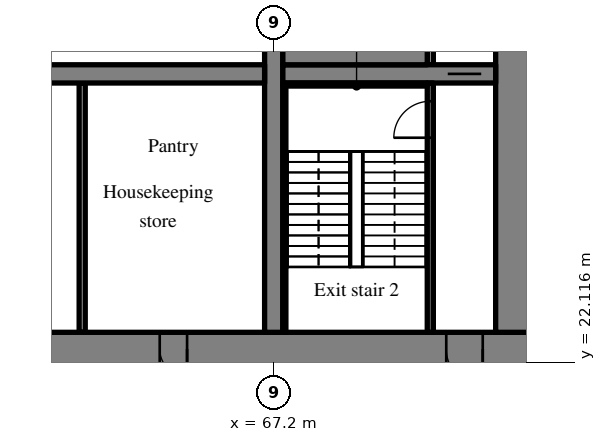
"""IFC4 building model, lengths in metres.
Left out: names, types, materials, properties, quantities, classifications, styles, units other than length and angle.
Written with IfcOpenShell. Run it as: python <this file> out.ifc"""

import sys

from ifc_helpers import new_model, si_unit, direction, frame, frame_2d, origin, place, context, subcontext, project, spatial, rectangle, extrude, source, transform, mapped, element, fill, save


model = new_model("IFC4")
c1 = context("Model", 3, precision=1e-05, world=origin(), true_north=direction((0.0, 1.0)))
c2 = subcontext(c1, "Body", "Model", "MODEL_VIEW")
j1 = project(units=[si_unit("LENGTHUNIT", "METRE"), si_unit("PLANEANGLEUNIT", "RADIAN")], contexts=[c1])
p1 = place(None, origin())
s1 = spatial("IfcSite", under=j1, at=p1, CompositionType="ELEMENT")
p2 = place(p1, origin())
s2 = spatial("IfcBuilding", under=s1, at=p2, CompositionType="ELEMENT")
p3 = place(p2, frame((0.0, 0.0, -9.0)))
s3 = spatial("IfcBuildingStorey", under=s2, at=p3, CompositionType="ELEMENT", Elevation=-9.0)
m1 = source(origin(), c2, "Body", "SweptSolid", [
    extrude(rectangle(XDim=50.4, YDim=1.1, at=frame_2d((25.2, 0.0))), origin(), (0.0, 0.0, 1.0), 4.22),
])
p4 = place(p3, frame((25.2, 22.55, 0.0), z_axis=(0.0, 0.0, 1.0), x_axis=(1.0, 0.0, 0.0)))
e1 = element("IfcWall", 1, at=p4, inside=s3, PredefinedType="SHEAR", context=c2, shape_type="MappedRepresentation", body=[
    mapped(m1, transform((0.0, 0.0, 0.0), scale=1.0)),
])
m2 = source(origin(), c2, "Body", "SweptSolid", [
    extrude(rectangle(XDim=1.8, YDim=2.1, at=frame_2d((0.9, 1.05))), frame((0.0, 0.56, 0.0), z_axis=(0.0, -1.0, 0.0), x_axis=(1.0, 0.0, 0.0)), (0.0, 0.0, 1.0), 1.12),
])
p5 = place(p4, frame((15.9, 0.0, 0.0)))
e2 = element("IfcOpeningElement", 2, at=p5, cuts=e1, PredefinedType="OPENING", context=c2, shape_type="MappedRepresentation", body=[
    mapped(m2, transform((0.0, 0.0, 0.0), scale=1.0)),
])
m3 = source(origin(), c2, "Body", "SweptSolid", [
    extrude(rectangle(XDim=1.2, YDim=2.1, at=frame_2d((0.6, 1.05))), frame((0.0, 0.56, 0.0), z_axis=(0.0, -1.0, 0.0), x_axis=(1.0, 0.0, 0.0)), (0.0, 0.0, 1.0), 1.12),
])
p6 = place(p4, frame((27.0, 0.0, 0.0)))
e3 = element("IfcOpeningElement", 3, at=p6, cuts=e1, PredefinedType="OPENING", context=c2, shape_type="MappedRepresentation", body=[
    mapped(m3, transform((0.0, 0.0, 0.0), scale=1.0)),
])
m4 = source(origin(), c2, "Body", "SweptSolid", [
    extrude(rectangle(XDim=0.9, YDim=2.1, at=frame_2d((0.45, 1.05))), frame((0.0, 0.56, 0.0), z_axis=(0.0, -1.0, 0.0), x_axis=(1.0, 0.0, 0.0)), (0.0, 0.0, 1.0), 1.12),
])
p7 = place(p4, frame((33.75, 0.0, 0.0)))
e4 = element("IfcOpeningElement", 4, at=p7, cuts=e1, PredefinedType="OPENING", context=c2, shape_type="MappedRepresentation", body=[
    mapped(m4, transform((0.0, 0.0, 0.0), scale=1.0)),
])
p8 = place(p4, frame((30.75, 0.0, 0.0)))
e5 = element("IfcOpeningElement", 5, at=p8, cuts=e1, PredefinedType="OPENING", context=c2, shape_type="MappedRepresentation", body=[
    mapped(m4, transform((0.0, 0.0, 0.0), scale=1.0)),
])
p9 = place(p4, frame((38.25, 0.0, 0.0)))
e6 = element("IfcOpeningElement", 6, at=p9, cuts=e1, PredefinedType="OPENING", context=c2, shape_type="MappedRepresentation", body=[
    mapped(m4, transform((0.0, 0.0, 0.0), scale=1.0)),
])
p10 = place(p4, frame((6.425, 0.0, 0.0)))
e7 = element("IfcOpeningElement", 7, at=p10, cuts=e1, PredefinedType="OPENING", context=c2, shape_type="MappedRepresentation", body=[
    mapped(m3, transform((0.0, 0.0, 0.0), scale=1.0)),
])
p11 = place(p4, frame((47.675, 0.0, 0.0)))
e8 = element("IfcOpeningElement", 8, at=p11, cuts=e1, PredefinedType="OPENING", context=c2, shape_type="MappedRepresentation", body=[
    mapped(m3, transform((0.0, 0.0, 0.0), scale=1.0)),
])
m5 = source(origin(), c2, "Body", "SweptSolid", [
    extrude(rectangle(XDim=17.8, YDim=1.1, at=frame_2d((8.9, 0.0))), origin(), (0.0, 0.0, 1.0), 4.22),
])
p12 = place(p3, frame((75.05, 23.1, 0.0), z_axis=(0.0, 0.0, 1.0), x_axis=(0.0, 1.0, 0.0)))
e9 = element("IfcWall", 9, at=p12, inside=s3, PredefinedType="SHEAR", context=c2, shape_type="MappedRepresentation", body=[
    mapped(m5, transform((0.0, 0.0, 0.0), scale=1.0)),
])
m6 = source(origin(), c2, "Body", "SweptSolid", [
    extrude(rectangle(XDim=17.8, YDim=0.6, at=frame_2d((8.9, 0.0))), origin(), (0.0, 0.0, 1.0), 4.22),
])
p13 = place(p3, frame((67.2, 23.1, 0.0), z_axis=(0.0, 0.0, 1.0), x_axis=(0.0, 1.0, 0.0)))
e10 = element("IfcWall", 10, at=p13, inside=s3, PredefinedType="SHEAR", context=c2, shape_type="MappedRepresentation", body=[
    mapped(m6, transform((0.0, 0.0, 0.0), scale=1.0)),
])
m7 = source(origin(), c2, "Body", "SweptSolid", [
    extrude(rectangle(XDim=16.2, YDim=0.6, at=frame_2d((8.1, 0.0))), origin(), (0.0, 0.0, 1.0), 4.22),
])
p14 = place(p3, frame((50.7, 31.6, 0.0), z_axis=(0.0, 0.0, 1.0), x_axis=(1.0, 0.0, 0.0)))
e11 = element("IfcWall", 11, at=p14, inside=s3, PredefinedType="SHEAR", context=c2, shape_type="MappedRepresentation", body=[
    mapped(m7, transform((0.0, 0.0, 0.0), scale=1.0)),
])
m8 = source(origin(), c2, "Body", "SweptSolid", [
    extrude(rectangle(XDim=1.0, YDim=2.1, at=frame_2d((0.5, 1.05))), frame((0.0, 0.31, 0.0), z_axis=(0.0, -1.0, 0.0), x_axis=(1.0, 0.0, 0.0)), (0.0, 0.0, 1.0), 0.62),
])
p15 = place(p14, frame((0.55, 0.0, 0.0)))
e12 = element("IfcOpeningElement", 12, at=p15, cuts=e11, PredefinedType="OPENING", context=c2, shape_type="MappedRepresentation", body=[
    mapped(m8, transform((0.0, 0.0, 0.0), scale=1.0)),
])
m9 = source(origin(), c2, "Body", "SweptSolid", [
    extrude(rectangle(XDim=7.0, YDim=0.6, at=frame_2d((3.5, 0.0))), origin(), (0.0, 0.0, 1.0), 4.22),
])
p16 = place(p3, frame((67.5, 31.6, 0.0), z_axis=(0.0, 0.0, 1.0), x_axis=(1.0, 0.0, 0.0)))
e13 = element("IfcWall", 13, at=p16, inside=s3, PredefinedType="SHEAR", context=c2, shape_type="MappedRepresentation", body=[
    mapped(m9, transform((0.0, 0.0, 0.0), scale=1.0)),
])
m10 = source(origin(), c2, "Body", "SweptSolid", [
    extrude(rectangle(XDim=1.1, YDim=2.1, at=frame_2d((0.55, 1.05))), frame((0.0, 0.31, 0.0), z_axis=(0.0, -1.0, 0.0), x_axis=(1.0, 0.0, 0.0)), (0.0, 0.0, 1.0), 0.62),
])
p17 = place(p16, frame((5.425, 0.0, 0.0)))
e14 = element("IfcOpeningElement", 14, at=p17, cuts=e13, PredefinedType="OPENING", context=c2, shape_type="MappedRepresentation", body=[
    mapped(m10, transform((0.0, 0.0, 0.0), scale=1.0)),
])
m11 = source(origin(), c2, "Body", "SweptSolid", [
    extrude(rectangle(XDim=8.2, YDim=0.2, at=frame_2d((4.1, 0.0))), origin(), (0.0, 0.0, 1.0), 4.22),
])
p18 = place(p3, frame((60.9, 23.1, 0.0), z_axis=(0.0, 0.0, 1.0), x_axis=(0.0, 1.0, 0.0)))
e15 = element("IfcWall", 15, at=p18, inside=s3, PredefinedType="PARTITIONING", context=c2, shape_type="MappedRepresentation", body=[
    mapped(m11, transform((0.0, 0.0, 0.0), scale=1.0)),
])
m12 = source(origin(), c2, "Body", "SweptSolid", [
    extrude(rectangle(XDim=8.2, YDim=0.2, at=frame_2d((4.1, 0.0))), origin(), (0.0, 0.0, 1.0), 4.22),
])
p19 = place(p3, frame((72.35, 23.1, 0.0), z_axis=(0.0, 0.0, 1.0), x_axis=(0.0, 1.0, 0.0)))
e16 = element("IfcWall", 16, at=p19, inside=s3, PredefinedType="SOLIDWALL", context=c2, shape_type="MappedRepresentation", body=[
    mapped(m12, transform((0.0, 0.0, 0.0), scale=1.0)),
])
m13 = source(origin(), c2, "Body", "SweptSolid", [
    extrude(rectangle(XDim=1.2, YDim=2.1, at=frame_2d((0.6, 1.05))), frame((0.0, 0.11, 0.0), z_axis=(0.0, -1.0, 0.0), x_axis=(1.0, 0.0, 0.0)), (0.0, 0.0, 1.0), 0.22),
])
p20 = place(p19, frame((6.4, 0.0, 0.0)))
e17 = element("IfcOpeningElement", 17, at=p20, cuts=e16, PredefinedType="OPENING", context=c2, shape_type="MappedRepresentation", body=[
    mapped(m13, transform((0.0, 0.0, 0.0), scale=1.0)),
])
m14 = source(origin(), c2, "Body", "SweptSolid", [
    extrude(rectangle(XDim=1.7, YDim=0.2, at=frame_2d((0.85, 0.0))), origin(), (0.0, 0.0, 1.0), 4.22),
])
p21 = place(p3, frame((72.35, 31.9, 0.0), z_axis=(0.0, 0.0, 1.0), x_axis=(0.0, 1.0, 0.0)))
e18 = element("IfcWall", 18, at=p21, inside=s3, PredefinedType="SOLIDWALL", context=c2, shape_type="MappedRepresentation", body=[
    mapped(m14, transform((0.0, 0.0, 0.0), scale=1.0)),
])
m15 = source(origin(), c2, "Body", "SweptSolid", [
    extrude(rectangle(XDim=4.75, YDim=0.1, at=frame_2d((2.375, 0.0))), origin(), (0.0, 0.0, 1.0), 4.22),
])
p22 = place(p3, frame((67.5, 31.25, 0.0), z_axis=(0.0, 0.0, 1.0), x_axis=(1.0, 0.0, 0.0)))
e19 = element("IfcWall", 19, at=p22, inside=s3, PredefinedType="SOLIDWALL", context=c2, shape_type="MappedRepresentation", body=[
    mapped(m15, transform((0.0, 0.0, 0.0), scale=1.0)),
])
m16 = source(origin(), c2, "Body", "SweptSolid", [
    extrude(rectangle(XDim=8.1, YDim=0.1, at=frame_2d((4.05, 0.0))), origin(), (0.0, 0.0, 1.0), 4.22),
])
p23 = place(p3, frame((67.55, 23.1, 0.0), z_axis=(0.0, 0.0, 1.0), x_axis=(0.0, 1.0, 0.0)))
e20 = element("IfcWall", 20, at=p23, inside=s3, PredefinedType="SOLIDWALL", context=c2, shape_type="MappedRepresentation", body=[
    mapped(m16, transform((0.0, 0.0, 0.0), scale=1.0)),
])
m17 = source(origin(), c2, "Body", "SweptSolid", [
    extrude(rectangle(XDim=4.75, YDim=0.9, at=frame_2d((2.375, 0.0))), origin(), (0.0, 0.0, 1.0), 4.22),
])
p24 = place(p3, frame((67.5, 32.35, 0.0), z_axis=(0.0, 0.0, 1.0), x_axis=(1.0, 0.0, 0.0)))
e21 = element("IfcWall", 21, at=p24, inside=s3, PredefinedType="SOLIDWALL", context=c2, shape_type="MappedRepresentation", body=[
    mapped(m17, transform((0.0, 0.0, 0.0), scale=1.0)),
])
m18 = source(origin(), c2, "Body", "SweptSolid", [
    extrude(rectangle(XDim=0.9, YDim=2.1, at=frame_2d((0.45, 1.05))), frame((0.0, 0.325, 0.0), z_axis=(0.0, -1.0, 0.0), x_axis=(1.0, 0.0, 0.0)), (0.0, 0.0, 1.0), 0.05),
])
p25 = place(p9, origin())
e22 = element("IfcDoor", 22, at=p25, inside=s3, OperationType="SINGLE_SWING_RIGHT", PredefinedType="DOOR", context=c2, shape_type="MappedRepresentation", body=[
    mapped(m18, transform((0.0, 0.0, 0.0), scale=1.0)),
])
fill(e6, e22)
m19 = source(origin(), c2, "Body", "SweptSolid", [
    extrude(rectangle(XDim=1.2, YDim=2.1, at=frame_2d((0.6, 1.05))), frame((0.0, 0.025, 0.0), z_axis=(0.0, -1.0, 0.0), x_axis=(1.0, 0.0, 0.0)), (0.0, 0.0, 1.0), 0.05),
])
p26 = place(p20, origin())
e23 = element("IfcDoor", 23, at=p26, inside=s3, OperationType="SINGLE_SWING_LEFT", PredefinedType="DOOR", context=c2, shape_type="MappedRepresentation", body=[
    mapped(m19, transform((0.0, 0.0, 0.0), scale=1.0)),
])
fill(e17, e23)
m20 = source(origin(), c2, "Body", "SweptSolid", [
    extrude(rectangle(XDim=1.2, YDim=2.1, at=frame_2d((0.6, 1.05))), frame((0.0, 0.325, 0.0), z_axis=(0.0, -1.0, 0.0), x_axis=(1.0, 0.0, 0.0)), (0.0, 0.0, 1.0), 0.05),
])
p27 = place(p11, origin())
e24 = element("IfcDoor", 24, at=p27, inside=s3, OperationType="SINGLE_SWING_RIGHT", PredefinedType="DOOR", context=c2, shape_type="MappedRepresentation", body=[
    mapped(m20, transform((0.0, 0.0, 0.0), scale=1.0)),
])
fill(e8, e24)
m21 = source(origin(), c2, "Body", "SweptSolid", [
    extrude(rectangle(XDim=1.1, YDim=2.1, at=frame_2d((0.55, 1.05))), frame((0.0, 0.025, 0.0), z_axis=(0.0, -1.0, 0.0), x_axis=(1.0, 0.0, 0.0)), (0.0, 0.0, 1.0), 0.05),
])
p28 = place(p17, origin())
e25 = element("IfcDoor", 25, at=p28, inside=s3, OperationType="SLIDING_TO_RIGHT", PredefinedType="DOOR", context=c2, shape_type="MappedRepresentation", body=[
    mapped(m21, transform((0.0, 0.0, 0.0), scale=1.0)),
])
fill(e14, e25)
save(model, sys.argv[1])
